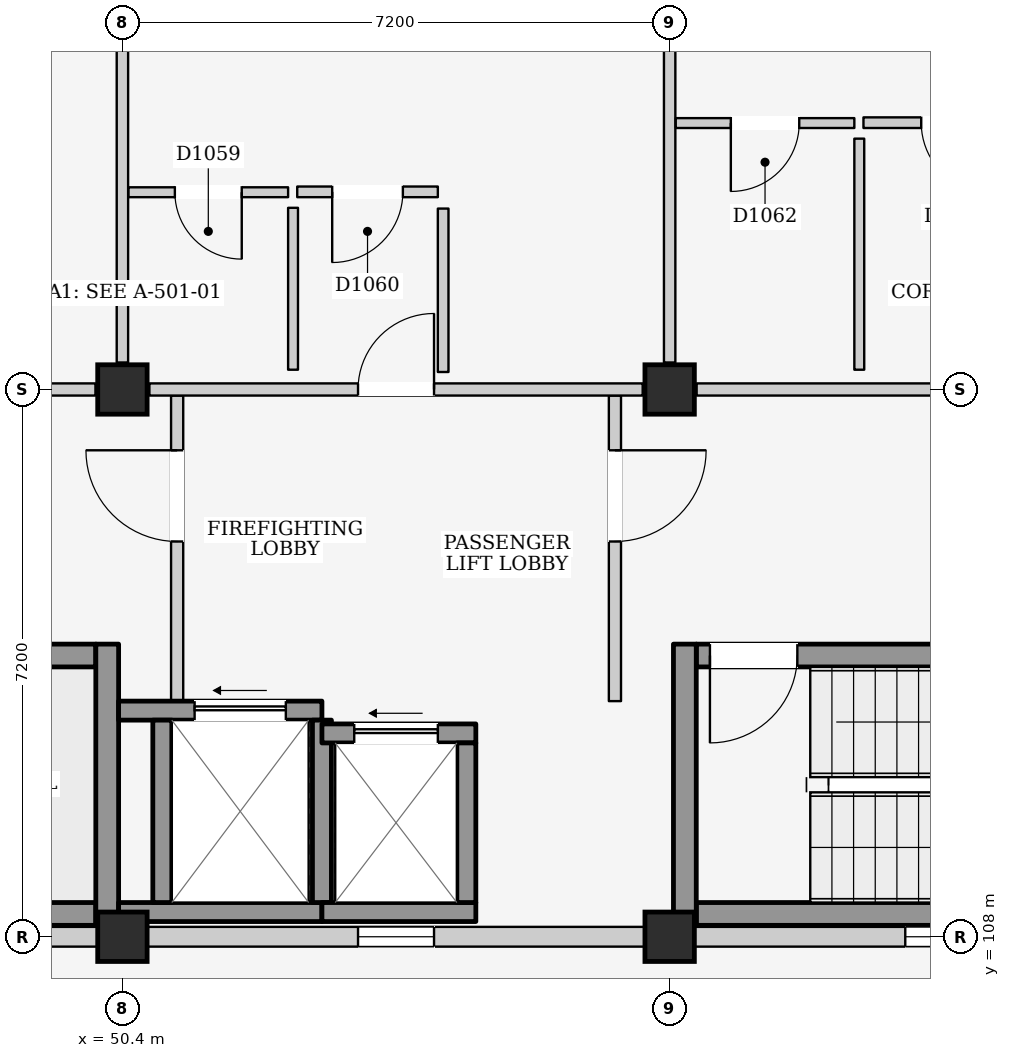
"""IFC4 building model, lengths in metres.
Left out: names, types, materials, properties, quantities, classifications, styles, units other than length and angle.
Written with IfcOpenShell. Run it as: python <this file> out.ifc"""

import sys

from ifc_helpers import new_model, si_unit, direction, frame, frame_2d, origin, origin_2d, place, context, subcontext, project, spatial, rectangle, extrude, element, fill, save


model = new_model("IFC4")
c1 = context("Model", 3, precision=1e-05, world=origin(), true_north=direction((0.0, 1.0)))
c2 = subcontext(c1, "Body", "Model", "MODEL_VIEW")
j1 = project(units=[si_unit("LENGTHUNIT", "METRE"), si_unit("PLANEANGLEUNIT", "RADIAN")], contexts=[c1])
p1 = place(None, origin())
s1 = spatial("IfcSite", under=j1, at=p1, CompositionType="ELEMENT")
p2 = place(p1, origin())
s2 = spatial("IfcBuilding", under=s1, at=p2, CompositionType="ELEMENT")
p3 = place(p2, frame((0.0, 0.0, 15.4)))
s3 = spatial("IfcBuildingStorey", under=s2, at=p3, CompositionType="ELEMENT", Elevation=15.4)
for number, where, z_axis, x_axis in (
    (1, (50.4, 108.0, 0.0), (0.0, 0.0, 1.0), (1.0, 0.0, 0.0)),
    (2, (50.4, 115.2, 0.0), (0.0, 0.0, 1.0), (1.0, 0.0, 0.0)),
    (3, (57.6, 108.0, 0.0), (0.0, 0.0, 1.0), (1.0, 0.0, 0.0)),
    (4, (57.6, 115.2, 0.0), (0.0, 0.0, 1.0), (1.0, 0.0, 0.0)),
):
    element("IfcColumn", number, at=place(p3, frame(where, z_axis=z_axis, x_axis=x_axis)), inside=s3, PredefinedType="COLUMN", context=c2, shape_type="SweptSolid", body=[
        extrude(rectangle(XDim=0.65, YDim=0.65, at=origin_2d()), origin(), (0.0, 0.0, 1.0), 3.2),
    ])
p4 = place(p3, frame((43.525, 108.0, 0.0), z_axis=(0.0, 0.0, 1.0), x_axis=(1.0, 0.0, 0.0)))
e5 = element("IfcWall", 5, at=p4, inside=s3, PredefinedType="ELEMENTEDWALL", context=c2, shape_type="SweptSolid", body=[
    extrude(rectangle(XDim=6.55, YDim=0.26, at=frame_2d((3.275, 0.0))), origin(), (0.0, 0.0, 1.0), 2.285),
])
p5 = place(p4, frame((2.775, 0.0, 1.2)))
e6 = element("IfcOpeningElement", 6, at=p5, cuts=e5, PredefinedType="OPENING", context=c2, shape_type="SweptSolid", body=[
    extrude(rectangle(XDim=1.0, YDim=0.9, at=frame_2d((0.5, 0.45))), frame((0.0, 0.145, 0.0), z_axis=(0.0, -1.0, 0.0), x_axis=(1.0, 0.0, 0.0)), (0.0, 0.0, 1.0), 0.29),
])
p6 = place(p3, frame((50.725, 108.0, 0.0), z_axis=(0.0, 0.0, 1.0), x_axis=(1.0, 0.0, 0.0)))
e7 = element("IfcWall", 7, at=p6, inside=s3, PredefinedType="ELEMENTEDWALL", context=c2, shape_type="SweptSolid", body=[
    extrude(rectangle(XDim=6.55, YDim=0.26, at=frame_2d((3.275, 0.0))), origin(), (0.0, 0.0, 1.0), 2.285),
])
p7 = place(p6, frame((2.775, 0.0, 1.2)))
e8 = element("IfcOpeningElement", 8, at=p7, cuts=e7, PredefinedType="OPENING", context=c2, shape_type="SweptSolid", body=[
    extrude(rectangle(XDim=1.0, YDim=0.9, at=frame_2d((0.5, 0.45))), frame((0.0, 0.145, 0.0), z_axis=(0.0, -1.0, 0.0), x_axis=(1.0, 0.0, 0.0)), (0.0, 0.0, 1.0), 0.29),
])
p8 = place(p3, frame((57.925, 108.0, 0.0), z_axis=(0.0, 0.0, 1.0), x_axis=(1.0, 0.0, 0.0)))
e9 = element("IfcWall", 9, at=p8, inside=s3, PredefinedType="ELEMENTEDWALL", context=c2, shape_type="SweptSolid", body=[
    extrude(rectangle(XDim=6.55, YDim=0.26, at=frame_2d((3.275, 0.0))), origin(), (0.0, 0.0, 1.0), 2.285),
])
p9 = place(p8, frame((2.775, 0.0, 1.2)))
e10 = element("IfcOpeningElement", 10, at=p9, cuts=e9, PredefinedType="OPENING", context=c2, shape_type="SweptSolid", body=[
    extrude(rectangle(XDim=1.0, YDim=0.9, at=frame_2d((0.5, 0.45))), frame((0.0, 0.145, 0.0), z_axis=(0.0, -1.0, 0.0), x_axis=(1.0, 0.0, 0.0)), (0.0, 0.0, 1.0), 0.29),
])
p10 = place(p3, frame((43.55, 108.3, 0.0), z_axis=(0.0, 0.0, 1.0), x_axis=(1.0, 0.0, 0.0)))
e11 = element("IfcWall", 11, at=p10, inside=s3, PredefinedType="SHEAR", context=c2, shape_type="SweptSolid", body=[
    extrude(rectangle(XDim=6.5, YDim=0.3, at=frame_2d((3.25, 0.0))), origin(), (0.0, 0.0, 1.0), 2.95),
])
p11 = place(p3, frame((43.55, 111.7, 0.0), z_axis=(0.0, 0.0, 1.0), x_axis=(1.0, 0.0, 0.0)))
e12 = element("IfcWall", 12, at=p11, inside=s3, PredefinedType="SHEAR", context=c2, shape_type="SweptSolid", body=[
    extrude(rectangle(XDim=6.5, YDim=0.3, at=frame_2d((3.25, 0.0))), origin(), (0.0, 0.0, 1.0), 2.95),
])
p12 = place(p11, frame((0.18, 0.0, 0.0)))
e13 = element("IfcOpeningElement", 13, at=p12, cuts=e12, PredefinedType="OPENING", context=c2, shape_type="SweptSolid", body=[
    extrude(rectangle(XDim=1.15, YDim=2.2, at=frame_2d((0.575, 1.1))), frame((0.0, 0.165, 0.0), z_axis=(0.0, -1.0, 0.0), x_axis=(1.0, 0.0, 0.0)), (0.0, 0.0, 1.0), 0.33),
])
p13 = place(p3, frame((50.2, 108.15, 0.0), z_axis=(0.0, 0.0, 1.0), x_axis=(0.0, 1.0, 0.0)))
e14 = element("IfcWall", 14, at=p13, inside=s3, PredefinedType="SHEAR", context=c2, shape_type="SweptSolid", body=[
    extrude(rectangle(XDim=3.7, YDim=0.3, at=frame_2d((1.85, 0.0))), origin(), (0.0, 0.0, 1.0), 2.95),
])
p14 = place(p3, frame((51.12, 111.1, 0.0), z_axis=(0.0, 0.0, 1.0), x_axis=(0.0, 1.0, 0.0)))
e15 = element("IfcWall", 15, at=p14, inside=s3, PredefinedType="PARTITIONING", context=c2, shape_type="SweptSolid", body=[
    extrude(rectangle(XDim=4.02, YDim=0.16, at=frame_2d((2.01, 0.0))), origin(), (0.0, 0.0, 1.0), 2.95),
])
p15 = place(p14, frame((2.1, 0.0, 0.0)))
e16 = element("IfcOpeningElement", 16, at=p15, cuts=e15, PredefinedType="OPENING", context=c2, shape_type="SweptSolid", body=[
    extrude(rectangle(XDim=1.2, YDim=2.2, at=frame_2d((0.6, 1.1))), frame((0.0, 0.095, 0.0), z_axis=(0.0, -1.0, 0.0), x_axis=(1.0, 0.0, 0.0)), (0.0, 0.0, 1.0), 0.19),
])
p16 = place(p3, frame((56.88, 111.1, 0.0), z_axis=(0.0, 0.0, 1.0), x_axis=(0.0, 1.0, 0.0)))
e17 = element("IfcWall", 17, at=p16, inside=s3, PredefinedType="PARTITIONING", context=c2, shape_type="SweptSolid", body=[
    extrude(rectangle(XDim=4.02, YDim=0.16, at=frame_2d((2.01, 0.0))), origin(), (0.0, 0.0, 1.0), 2.95),
])
p17 = place(p16, frame((2.1, 0.0, 0.0)))
e18 = element("IfcOpeningElement", 18, at=p17, cuts=e17, PredefinedType="OPENING", context=c2, shape_type="SweptSolid", body=[
    extrude(rectangle(XDim=1.2, YDim=2.2, at=frame_2d((0.6, 1.1))), frame((0.0, 0.095, 0.0), z_axis=(0.0, -1.0, 0.0), x_axis=(1.0, 0.0, 0.0)), (0.0, 0.0, 1.0), 0.19),
])
p18 = place(p3, frame((50.35, 108.325, 0.0), z_axis=(0.0, 0.0, 1.0), x_axis=(1.0, 0.0, 0.0)))
e19 = element("IfcWall", 19, at=p18, inside=s3, PredefinedType="SHEAR", context=c2, shape_type="SweptSolid", body=[
    extrude(rectangle(XDim=2.675, YDim=0.25, at=frame_2d((1.337, 0.0))), origin(), (0.0, 0.0, 1.0), 2.95),
])
p19 = place(p3, frame((50.35, 110.975, 0.0), z_axis=(0.0, 0.0, 1.0), x_axis=(1.0, 0.0, 0.0)))
e20 = element("IfcWall", 20, at=p19, inside=s3, PredefinedType="SHEAR", context=c2, shape_type="SweptSolid", body=[
    extrude(rectangle(XDim=2.675, YDim=0.25, at=frame_2d((1.337, 0.0))), origin(), (0.0, 0.0, 1.0), 2.95),
])
p20 = place(p19, frame((1.0, 0.0, 0.0)))
e21 = element("IfcOpeningElement", 21, at=p20, cuts=e20, PredefinedType="OPENING", context=c2, shape_type="SweptSolid", body=[
    extrude(rectangle(XDim=1.2, YDim=2.25, at=frame_2d((0.6, 1.125))), frame((0.0, 0.14, 0.0), z_axis=(0.0, -1.0, 0.0), x_axis=(1.0, 0.0, 0.0)), (0.0, 0.0, 1.0), 0.28),
])
for number, where, z_axis, x_axis in (
    (22, (50.925, 108.45, 0.0), (0.0, 0.0, 1.0), (0.0, 1.0, 0.0)),
    (23, (53.025, 108.45, 0.0), (0.0, 0.0, 1.0), (0.0, 1.0, 0.0)),
):
    element("IfcWall", number, at=place(p3, frame(where, z_axis=z_axis, x_axis=x_axis)), inside=s3, PredefinedType="SHEAR", context=c2, shape_type="SweptSolid", body=[
        extrude(rectangle(XDim=2.4, YDim=0.25, at=frame_2d((1.2, 0.0))), origin(), (0.0, 0.0, 1.0), 2.95),
    ])
p21 = place(p3, frame((53.025, 108.325, 0.0), z_axis=(0.0, 0.0, 1.0), x_axis=(1.0, 0.0, 0.0)))
e24 = element("IfcWall", 24, at=p21, inside=s3, PredefinedType="SHEAR", context=c2, shape_type="SweptSolid", body=[
    extrude(rectangle(XDim=2.025, YDim=0.25, at=frame_2d((1.013, 0.0))), origin(), (0.0, 0.0, 1.0), 2.95),
])
p22 = place(p3, frame((53.025, 110.675, 0.0), z_axis=(0.0, 0.0, 1.0), x_axis=(1.0, 0.0, 0.0)))
e25 = element("IfcWall", 25, at=p22, inside=s3, PredefinedType="SHEAR", context=c2, shape_type="SweptSolid", body=[
    extrude(rectangle(XDim=2.025, YDim=0.25, at=frame_2d((1.013, 0.0))), origin(), (0.0, 0.0, 1.0), 2.95),
])
p23 = place(p22, frame((0.425, 0.0, 0.0)))
e26 = element("IfcOpeningElement", 26, at=p23, cuts=e25, PredefinedType="OPENING", context=c2, shape_type="SweptSolid", body=[
    extrude(rectangle(XDim=1.1, YDim=2.15, at=frame_2d((0.55, 1.075))), frame((0.0, 0.14, 0.0), z_axis=(0.0, -1.0, 0.0), x_axis=(1.0, 0.0, 0.0)), (0.0, 0.0, 1.0), 0.28),
])
p24 = place(p3, frame((54.925, 108.45, 0.0), z_axis=(0.0, 0.0, 1.0), x_axis=(0.0, 1.0, 0.0)))
e27 = element("IfcWall", 27, at=p24, inside=s3, PredefinedType="SHEAR", context=c2, shape_type="SweptSolid", body=[
    extrude(rectangle(XDim=2.1, YDim=0.25, at=frame_2d((1.05, 0.0))), origin(), (0.0, 0.0, 1.0), 2.95),
])
p25 = place(p3, frame((57.95, 108.3, 0.0), z_axis=(0.0, 0.0, 1.0), x_axis=(1.0, 0.0, 0.0)))
e28 = element("IfcWall", 28, at=p25, inside=s3, PredefinedType="SHEAR", context=c2, shape_type="SweptSolid", body=[
    extrude(rectangle(XDim=6.5, YDim=0.3, at=frame_2d((3.25, 0.0))), origin(), (0.0, 0.0, 1.0), 2.95),
])
p26 = place(p3, frame((57.95, 111.7, 0.0), z_axis=(0.0, 0.0, 1.0), x_axis=(1.0, 0.0, 0.0)))
e29 = element("IfcWall", 29, at=p26, inside=s3, PredefinedType="SHEAR", context=c2, shape_type="SweptSolid", body=[
    extrude(rectangle(XDim=6.5, YDim=0.3, at=frame_2d((3.25, 0.0))), origin(), (0.0, 0.0, 1.0), 2.95),
])
p27 = place(p26, frame((0.18, 0.0, 0.0)))
e30 = element("IfcOpeningElement", 30, at=p27, cuts=e29, PredefinedType="OPENING", context=c2, shape_type="SweptSolid", body=[
    extrude(rectangle(XDim=1.15, YDim=2.2, at=frame_2d((0.575, 1.1))), frame((0.0, 0.165, 0.0), z_axis=(0.0, -1.0, 0.0), x_axis=(1.0, 0.0, 0.0)), (0.0, 0.0, 1.0), 0.33),
])
p28 = place(p3, frame((57.8, 108.15, 0.0), z_axis=(0.0, 0.0, 1.0), x_axis=(0.0, 1.0, 0.0)))
e31 = element("IfcWall", 31, at=p28, inside=s3, PredefinedType="SHEAR", context=c2, shape_type="SweptSolid", body=[
    extrude(rectangle(XDim=3.7, YDim=0.3, at=frame_2d((1.85, 0.0))), origin(), (0.0, 0.0, 1.0), 2.95),
])
p29 = place(p3, frame((43.555, 115.2, 0.0), z_axis=(0.0, 0.0, 1.0), x_axis=(1.0, 0.0, 0.0)))
e32 = element("IfcWall", 32, at=p29, inside=s3, PredefinedType="PARTITIONING", context=c2, shape_type="SweptSolid", body=[
    extrude(rectangle(XDim=6.49, YDim=0.16, at=frame_2d((3.245, 0.0))), origin(), (0.0, 0.0, 1.0), 2.285),
])
p30 = place(p29, frame((2.745, 0.0, 0.0)))
e33 = element("IfcOpeningElement", 33, at=p30, cuts=e32, PredefinedType="OPENING", context=c2, shape_type="SweptSolid", body=[
    extrude(rectangle(XDim=1.0, YDim=2.15, at=frame_2d((0.5, 1.075))), frame((0.0, 0.095, 0.0), z_axis=(0.0, -1.0, 0.0), x_axis=(1.0, 0.0, 0.0)), (0.0, 0.0, 1.0), 0.19),
])
p31 = place(p3, frame((50.4, 115.555, 0.0), z_axis=(0.0, 0.0, 1.0), x_axis=(0.0, 1.0, 0.0)))
e34 = element("IfcWall", 34, at=p31, inside=s3, PredefinedType="PARTITIONING", context=c2, shape_type="SweptSolid", body=[
    extrude(rectangle(XDim=6.49, YDim=0.15, at=frame_2d((3.245, 0.0))), origin(), (0.0, 0.0, 1.0), 2.385),
])
p32 = place(p3, frame((50.755, 115.2, 0.0), z_axis=(0.0, 0.0, 1.0), x_axis=(1.0, 0.0, 0.0)))
e35 = element("IfcWall", 35, at=p32, inside=s3, PredefinedType="PARTITIONING", context=c2, shape_type="SweptSolid", body=[
    extrude(rectangle(XDim=6.49, YDim=0.16, at=frame_2d((3.245, 0.0))), origin(), (0.0, 0.0, 1.0), 2.285),
])
p33 = place(p32, frame((2.745, 0.0, 0.0)))
e36 = element("IfcOpeningElement", 36, at=p33, cuts=e35, PredefinedType="OPENING", context=c2, shape_type="SweptSolid", body=[
    extrude(rectangle(XDim=1.0, YDim=2.15, at=frame_2d((0.5, 1.075))), frame((0.0, 0.095, 0.0), z_axis=(0.0, -1.0, 0.0), x_axis=(1.0, 0.0, 0.0)), (0.0, 0.0, 1.0), 0.19),
])
p34 = place(p3, frame((57.6, 115.555, 0.0), z_axis=(0.0, 0.0, 1.0), x_axis=(0.0, 1.0, 0.0)))
e37 = element("IfcWall", 37, at=p34, inside=s3, PredefinedType="PARTITIONING", context=c2, shape_type="SweptSolid", body=[
    extrude(rectangle(XDim=6.49, YDim=0.15, at=frame_2d((3.245, 0.0))), origin(), (0.0, 0.0, 1.0), 2.385),
])
p35 = place(p3, frame((50.48, 117.795, 0.0), z_axis=(0.0, 0.0, 1.0), x_axis=(1.0, 0.0, 0.0)))
e38 = element("IfcWall", 38, at=p35, inside=s3, PredefinedType="PARTITIONING", context=c2, shape_type="SweptSolid", body=[
    extrude(rectangle(XDim=2.1, YDim=0.13, at=frame_2d((1.05, 0.0))), origin(), (0.0, 0.0, 1.0), 2.95),
])
p36 = place(p35, frame((0.61, 0.0, 0.0)))
e39 = element("IfcOpeningElement", 39, at=p36, cuts=e38, PredefinedType="OPENING", context=c2, shape_type="SweptSolid", body=[
    extrude(rectangle(XDim=0.88, YDim=2.1, at=frame_2d((0.44, 1.05))), frame((0.0, 0.08, 0.0), z_axis=(0.0, -1.0, 0.0), x_axis=(1.0, 0.0, 0.0)), (0.0, 0.0, 1.0), 0.16),
])
p37 = place(p3, frame((52.645, 115.46, 0.0), z_axis=(0.0, 0.0, 1.0), x_axis=(0.0, 1.0, 0.0)))
e40 = element("IfcWall", 40, at=p37, inside=s3, PredefinedType="PARTITIONING", context=c2, shape_type="SweptSolid", body=[
    extrude(rectangle(XDim=2.13, YDim=0.13, at=frame_2d((1.065, 0.0))), origin(), (0.0, 0.0, 1.0), 2.95),
])
p38 = place(p3, frame((52.7, 117.8, 0.0), z_axis=(0.0, 0.0, 1.0), x_axis=(1.0, 0.0, 0.0)))
e41 = element("IfcWall", 41, at=p38, inside=s3, PredefinedType="PARTITIONING", context=c2, shape_type="SweptSolid", body=[
    extrude(rectangle(XDim=1.85, YDim=0.14, at=frame_2d((0.925, 0.0))), origin(), (0.0, 0.0, 1.0), 2.95),
])
p39 = place(p38, frame((0.46, 0.0, 0.0)))
e42 = element("IfcOpeningElement", 42, at=p39, cuts=e41, PredefinedType="OPENING", context=c2, shape_type="SweptSolid", body=[
    extrude(rectangle(XDim=0.93, YDim=2.14, at=frame_2d((0.465, 1.07))), frame((0.0, 0.085, 0.0), z_axis=(0.0, -1.0, 0.0), x_axis=(1.0, 0.0, 0.0)), (0.0, 0.0, 1.0), 0.17),
])
p40 = place(p3, frame((54.62, 115.43, 0.0), z_axis=(0.0, 0.0, 1.0), x_axis=(0.0, 1.0, 0.0)))
e43 = element("IfcWall", 43, at=p40, inside=s3, PredefinedType="PARTITIONING", context=c2, shape_type="SweptSolid", body=[
    extrude(rectangle(XDim=2.15, YDim=0.14, at=frame_2d((1.075, 0.0))), origin(), (0.0, 0.0, 1.0), 2.95),
])
p41 = place(p3, frame((57.955, 115.2, 0.0), z_axis=(0.0, 0.0, 1.0), x_axis=(1.0, 0.0, 0.0)))
e44 = element("IfcWall", 44, at=p41, inside=s3, PredefinedType="PARTITIONING", context=c2, shape_type="SweptSolid", body=[
    extrude(rectangle(XDim=6.49, YDim=0.16, at=frame_2d((3.245, 0.0))), origin(), (0.0, 0.0, 1.0), 2.285),
])
p42 = place(p41, frame((5.245, 0.0, 0.0)))
e45 = element("IfcOpeningElement", 45, at=p42, cuts=e44, PredefinedType="OPENING", context=c2, shape_type="SweptSolid", body=[
    extrude(rectangle(XDim=1.0, YDim=2.15, at=frame_2d((0.5, 1.075))), frame((0.0, 0.095, 0.0), z_axis=(0.0, -1.0, 0.0), x_axis=(1.0, 0.0, 0.0)), (0.0, 0.0, 1.0), 0.19),
])
p43 = place(p3, frame((57.68, 118.705, 0.0), z_axis=(0.0, 0.0, 1.0), x_axis=(1.0, 0.0, 0.0)))
e46 = element("IfcWall", 46, at=p43, inside=s3, PredefinedType="PARTITIONING", context=c2, shape_type="SweptSolid", body=[
    extrude(rectangle(XDim=2.35, YDim=0.13, at=frame_2d((1.175, 0.0))), origin(), (0.0, 0.0, 1.0), 2.95),
])
p44 = place(p43, frame((0.725, 0.0, 0.0)))
e47 = element("IfcOpeningElement", 47, at=p44, cuts=e46, PredefinedType="OPENING", context=c2, shape_type="SweptSolid", body=[
    extrude(rectangle(XDim=0.9, YDim=2.1, at=frame_2d((0.45, 1.05))), frame((0.0, 0.08, 0.0), z_axis=(0.0, -1.0, 0.0), x_axis=(1.0, 0.0, 0.0)), (0.0, 0.0, 1.0), 0.16),
])
p45 = place(p3, frame((60.095, 115.46, 0.0), z_axis=(0.0, 0.0, 1.0), x_axis=(0.0, 1.0, 0.0)))
e48 = element("IfcWall", 48, at=p45, inside=s3, PredefinedType="PARTITIONING", context=c2, shape_type="SweptSolid", body=[
    extrude(rectangle(XDim=3.04, YDim=0.13, at=frame_2d((1.52, 0.0))), origin(), (0.0, 0.0, 1.0), 2.95),
])
p46 = place(p3, frame((60.15, 118.71, 0.0), z_axis=(0.0, 0.0, 1.0), x_axis=(1.0, 0.0, 0.0)))
e49 = element("IfcWall", 49, at=p46, inside=s3, PredefinedType="PARTITIONING", context=c2, shape_type="SweptSolid", body=[
    extrude(rectangle(XDim=2.45, YDim=0.14, at=frame_2d((1.225, 0.0))), origin(), (0.0, 0.0, 1.0), 2.95),
])
p47 = place(p46, frame((0.76, 0.0, 0.0)))
e50 = element("IfcOpeningElement", 50, at=p47, cuts=e49, PredefinedType="OPENING", context=c2, shape_type="SweptSolid", body=[
    extrude(rectangle(XDim=0.93, YDim=2.14, at=frame_2d((0.465, 1.07))), frame((0.0, 0.085, 0.0), z_axis=(0.0, -1.0, 0.0), x_axis=(1.0, 0.0, 0.0)), (0.0, 0.0, 1.0), 0.17),
])
p48 = place(p7, origin())
e51 = element("IfcWindow", 51, at=p48, inside=s3, PartitioningType="SINGLE_PANEL", PredefinedType="WINDOW", context=c2, shape_type="SweptSolid", body=[
    extrude(rectangle(XDim=1.0, YDim=0.9, at=frame_2d((0.5, 0.45))), frame((0.0, 0.03, 0.0), z_axis=(0.0, -1.0, 0.0), x_axis=(1.0, 0.0, 0.0)), (0.0, 0.0, 1.0), 0.06),
])
fill(e8, e51)
p49 = place(p9, origin())
e52 = element("IfcWindow", 52, at=p49, inside=s3, PartitioningType="SINGLE_PANEL", PredefinedType="WINDOW", context=c2, shape_type="SweptSolid", body=[
    extrude(rectangle(XDim=1.0, YDim=0.9, at=frame_2d((0.5, 0.45))), frame((0.0, 0.03, 0.0), z_axis=(0.0, -1.0, 0.0), x_axis=(1.0, 0.0, 0.0)), (0.0, 0.0, 1.0), 0.06),
])
fill(e10, e52)
p50 = place(p15, origin())
e53 = element("IfcDoor", 53, at=p50, inside=s3, OperationType="SINGLE_SWING_RIGHT", PredefinedType="DOOR", context=c2, shape_type="SweptSolid", body=[
    extrude(rectangle(XDim=1.2, YDim=2.2, at=frame_2d((0.6, 1.1))), frame((0.0, 0.025, 0.0), z_axis=(0.0, -1.0, 0.0), x_axis=(1.0, 0.0, 0.0)), (0.0, 0.0, 1.0), 0.05),
])
fill(e16, e53)
p51 = place(p17, frame((1.2, 0.0, 0.0), z_axis=(0.0, 0.0, 1.0), x_axis=(-1.0, 0.0, 0.0)))
e54 = element("IfcDoor", 54, at=p51, inside=s3, OperationType="SINGLE_SWING_LEFT", PredefinedType="DOOR", context=c2, shape_type="SweptSolid", body=[
    extrude(rectangle(XDim=1.2, YDim=2.2, at=frame_2d((0.6, 1.1))), frame((0.0, 0.025, 0.0), z_axis=(0.0, -1.0, 0.0), x_axis=(1.0, 0.0, 0.0)), (0.0, 0.0, 1.0), 0.05),
])
fill(e18, e54)
p52 = place(p20, origin())
e55 = element("IfcDoor", 55, at=p52, inside=s3, OperationType="SLIDING_TO_LEFT", PredefinedType="DOOR", context=c2, shape_type="SweptSolid", body=[
    extrude(rectangle(XDim=1.2, YDim=2.25, at=frame_2d((0.6, 1.125))), frame((0.0, 0.025, 0.0), z_axis=(0.0, -1.0, 0.0), x_axis=(1.0, 0.0, 0.0)), (0.0, 0.0, 1.0), 0.05),
])
fill(e21, e55)
p53 = place(p23, origin())
e56 = element("IfcDoor", 56, at=p53, inside=s3, OperationType="SLIDING_TO_LEFT", PredefinedType="DOOR", context=c2, shape_type="SweptSolid", body=[
    extrude(rectangle(XDim=1.1, YDim=2.15, at=frame_2d((0.55, 1.075))), frame((0.0, 0.025, 0.0), z_axis=(0.0, -1.0, 0.0), x_axis=(1.0, 0.0, 0.0)), (0.0, 0.0, 1.0), 0.05),
])
fill(e26, e56)
p54 = place(p27, frame((1.15, 0.0, 0.0), z_axis=(0.0, 0.0, 1.0), x_axis=(-1.0, 0.0, 0.0)))
e57 = element("IfcDoor", 57, at=p54, inside=s3, OperationType="SINGLE_SWING_RIGHT", PredefinedType="DOOR", context=c2, shape_type="SweptSolid", body=[
    extrude(rectangle(XDim=1.15, YDim=2.2, at=frame_2d((0.575, 1.1))), frame((0.0, 0.025, 0.0), z_axis=(0.0, -1.0, 0.0), x_axis=(1.0, 0.0, 0.0)), (0.0, 0.0, 1.0), 0.05),
])
fill(e30, e57)
p55 = place(p33, origin())
e58 = element("IfcDoor", 58, at=p55, inside=s3, OperationType="SINGLE_SWING_RIGHT", PredefinedType="DOOR", context=c2, shape_type="SweptSolid", body=[
    extrude(rectangle(XDim=1.0, YDim=2.15, at=frame_2d((0.5, 1.075))), frame((0.0, 0.025, 0.0), z_axis=(0.0, -1.0, 0.0), x_axis=(1.0, 0.0, 0.0)), (0.0, 0.0, 1.0), 0.05),
])
fill(e36, e58)
p56 = place(p36, frame((0.88, 0.0, 0.0), z_axis=(0.0, 0.0, 1.0), x_axis=(-1.0, 0.0, 0.0)))
e59 = element("IfcDoor", 59, at=p56, inside=s3, OperationType="SINGLE_SWING_LEFT", PredefinedType="DOOR", context=c2, shape_type="SweptSolid", body=[
    extrude(rectangle(XDim=0.88, YDim=2.1, at=frame_2d((0.44, 1.05))), frame((0.0, 0.025, 0.0), z_axis=(0.0, -1.0, 0.0), x_axis=(1.0, 0.0, 0.0)), (0.0, 0.0, 1.0), 0.05),
])
fill(e39, e59)
p57 = place(p39, frame((0.93, 0.0, 0.0), z_axis=(0.0, 0.0, 1.0), x_axis=(-1.0, 0.0, 0.0)))
e60 = element("IfcDoor", 60, at=p57, inside=s3, OperationType="SINGLE_SWING_RIGHT", PredefinedType="DOOR", context=c2, shape_type="SweptSolid", body=[
    extrude(rectangle(XDim=0.93, YDim=2.14, at=frame_2d((0.465, 1.07))), frame((0.0, 0.025, 0.0), z_axis=(0.0, -1.0, 0.0), x_axis=(1.0, 0.0, 0.0)), (0.0, 0.0, 1.0), 0.05),
])
fill(e42, e60)
p58 = place(p44, frame((0.9, 0.0, 0.0), z_axis=(0.0, 0.0, 1.0), x_axis=(-1.0, 0.0, 0.0)))
e61 = element("IfcDoor", 61, at=p58, inside=s3, OperationType="SINGLE_SWING_RIGHT", PredefinedType="DOOR", context=c2, shape_type="SweptSolid", body=[
    extrude(rectangle(XDim=0.9, YDim=2.1, at=frame_2d((0.45, 1.05))), frame((0.0, 0.025, 0.0), z_axis=(0.0, -1.0, 0.0), x_axis=(1.0, 0.0, 0.0)), (0.0, 0.0, 1.0), 0.05),
])
fill(e47, e61)
p59 = place(p47, frame((0.93, 0.0, 0.0), z_axis=(0.0, 0.0, 1.0), x_axis=(-1.0, 0.0, 0.0)))
e62 = element("IfcDoor", 62, at=p59, inside=s3, OperationType="SINGLE_SWING_LEFT", PredefinedType="DOOR", context=c2, shape_type="SweptSolid", body=[
    extrude(rectangle(XDim=0.93, YDim=2.14, at=frame_2d((0.465, 1.07))), frame((0.0, 0.025, 0.0), z_axis=(0.0, -1.0, 0.0), x_axis=(1.0, 0.0, 0.0)), (0.0, 0.0, 1.0), 0.05),
])
fill(e50, e62)
save(model, sys.argv[1])
